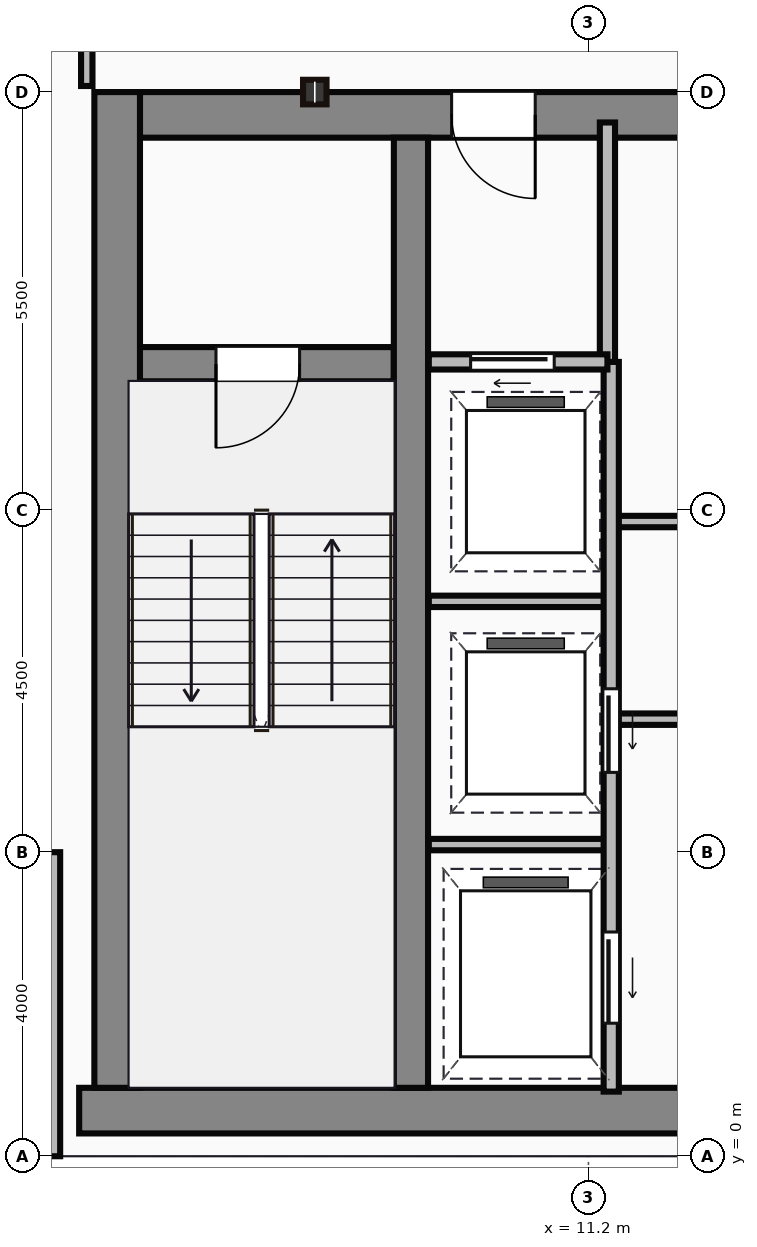
"""IFC4 building model, lengths in metres.
Left out: names, types, materials, properties, quantities, classifications, styles, units other than length and angle.
Written with IfcOpenShell. Run it as: python <this file> out.ifc"""

import sys

from ifc_helpers import new_model, si_unit, direction, frame, frame_2d, origin, origin_2d, place, context, subcontext, project, spatial, rectangle, i_section, extrude, source, transform, mapped, element, fill, save


model = new_model("IFC4")
c1 = context("Model", 3, precision=1e-05, world=origin(), true_north=direction((0.0, 1.0)))
c2 = subcontext(c1, "Body", "Model", "MODEL_VIEW")
j1 = project(units=[si_unit("LENGTHUNIT", "METRE"), si_unit("PLANEANGLEUNIT", "RADIAN")], contexts=[c1])
p1 = place(None, origin())
s1 = spatial("IfcSite", under=j1, at=p1, CompositionType="ELEMENT")
p2 = place(p1, origin())
s2 = spatial("IfcBuilding", under=s1, at=p2, CompositionType="ELEMENT")
p3 = place(p2, frame((0.0, 0.0, 221.45)))
s3 = spatial("IfcBuildingStorey", under=s2, at=p3, CompositionType="ELEMENT", Elevation=221.45)
m1 = source(origin(), c2, "Body", "SweptSolid", [
    extrude(rectangle(XDim=29.5, YDim=0.6, at=frame_2d((14.75, 0.0))), origin(), (0.0, 0.0, 1.0), 3.65),
])
p4 = place(p3, frame((4.5, 0.6, 0.0), z_axis=(0.0, 0.0, 1.0), x_axis=(1.0, 0.0, 0.0)))
e1 = element("IfcWall", 1, at=p4, inside=s3, PredefinedType="SHEAR", context=c2, shape_type="MappedRepresentation", body=[
    mapped(m1, transform((0.0, 0.0, 0.0))),
])
m2 = source(origin(), c2, "Body", "SweptSolid", [
    extrude(rectangle(XDim=13.1, YDim=0.6, at=frame_2d((6.55, 0.0))), origin(), (0.0, 0.0, 1.0), 3.65),
])
p5 = place(p3, frame((5.0, 0.9, 0.0), z_axis=(0.0, 0.0, 1.0), x_axis=(0.0, 1.0, 0.0)))
e2 = element("IfcWall", 2, at=p5, inside=s3, PredefinedType="SHEAR", context=c2, shape_type="MappedRepresentation", body=[
    mapped(m2, transform((0.0, 0.0, 0.0))),
])
m3 = source(origin(), c2, "Body", "SweptSolid", [
    extrude(rectangle(XDim=9.1, YDim=0.6, at=frame_2d((4.55, 0.0))), origin(), (0.0, 0.0, 1.0), 3.65),
])
p6 = place(p3, frame((5.3, 13.7, 0.0), z_axis=(0.0, 0.0, 1.0), x_axis=(1.0, 0.0, 0.0)))
e3 = element("IfcWall", 3, at=p6, inside=s3, PredefinedType="SHEAR", context=c2, shape_type="MappedRepresentation", body=[
    mapped(m3, transform((0.0, 0.0, 0.0))),
])
p7 = place(p6, frame((4.1, 0.0, 0.0)))
e4 = element("IfcOpeningElement", 4, at=p7, cuts=e3, PredefinedType="OPENING", context=c2, shape_type="SweptSolid", body=[
    extrude(rectangle(XDim=1.1, YDim=2.15, at=frame_2d((0.55, 1.075))), frame((0.0, 0.31, 0.0), z_axis=(0.0, -1.0, 0.0), x_axis=(1.0, 0.0, 0.0)), (0.0, 0.0, 1.0), 0.62),
])
m4 = source(origin(), c2, "Body", "SweptSolid", [
    extrude(rectangle(XDim=12.5, YDim=0.45, at=frame_2d((6.25, 0.0))), origin(), (0.0, 0.0, 1.0), 3.65),
])
p8 = place(p3, frame((8.865, 0.9, 0.0), z_axis=(0.0, 0.0, 1.0), x_axis=(0.0, 1.0, 0.0)))
e5 = element("IfcWall", 5, at=p8, inside=s3, PredefinedType="SHEAR", context=c2, shape_type="MappedRepresentation", body=[
    mapped(m4, transform((0.0, 0.0, 0.0))),
])
m5 = source(origin(), c2, "Body", "SweptSolid", [
    extrude(rectangle(XDim=3.39, YDim=0.45, at=frame_2d((1.695, 0.0))), origin(), (0.0, 0.0, 1.0), 3.65),
])
p9 = place(p3, frame((5.25, 10.42, 0.0), z_axis=(0.0, 0.0, 1.0), x_axis=(1.0, 0.0, 0.0)))
e6 = element("IfcWall", 6, at=p9, inside=s3, PredefinedType="SHEAR", context=c2, shape_type="MappedRepresentation", body=[
    mapped(m5, transform((0.0, 0.0, 0.0))),
])
p10 = place(p9, frame((1.05, 0.0, 0.0)))
e7 = element("IfcOpeningElement", 7, at=p10, cuts=e6, PredefinedType="OPENING", context=c2, shape_type="SweptSolid", body=[
    extrude(rectangle(XDim=1.1, YDim=2.15, at=frame_2d((0.55, 1.075))), frame((0.0, 0.235, 0.0), z_axis=(0.0, -1.0, 0.0), x_axis=(1.0, 0.0, 0.0)), (0.0, 0.0, 1.0), 0.47),
])
m6 = source(origin(), c2, "Body", "SweptSolid", [
    extrude(i_section(OverallWidth=0.309, OverallDepth=0.323, WebThickness=0.014, FlangeThickness=0.023, at=origin_2d()), origin(), (0.0, 0.0, 1.0), 3.65),
])
p11 = place(p3, frame((7.6, 14.0, 0.0), z_axis=(0.0, 0.0, 1.0), x_axis=(1.0, 0.0, 0.0)))
e8 = element("IfcColumn", 8, at=p11, inside=s3, PredefinedType="COLUMN", context=c2, shape_type="MappedRepresentation", body=[
    mapped(m6, transform((0.0, 0.0, 0.0))),
])
m7 = source(origin(), c2, "Body", "SweptSolid", [
    extrude(rectangle(XDim=4.0, YDim=0.25, at=frame_2d((2.0, 0.0))), origin(), (0.0, 0.0, 1.0), 3.4),
])
p12 = place(p3, frame((4.125, 4.0, 0.0), z_axis=(0.0, 0.0, 1.0), x_axis=(0.0, -1.0, 0.0)))
e9 = element("IfcWall", 9, at=p12, inside=s3, PredefinedType="STANDARD", context=c2, shape_type="MappedRepresentation", body=[
    mapped(m7, transform((0.0, 0.0, 0.0))),
])
m8 = source(origin(), c2, "Body", "SweptSolid", [
    extrude(rectangle(XDim=3.18, YDim=0.2, at=frame_2d((1.59, 0.0))), origin(), (0.0, 0.0, 1.0), 3.4),
])
p13 = place(p3, frame((11.45, 10.42, 0.0), z_axis=(0.0, 0.0, 1.0), x_axis=(0.0, 1.0, 0.0)))
e10 = element("IfcWall", 10, at=p13, inside=s3, PredefinedType="PARTITIONING", context=c2, shape_type="MappedRepresentation", body=[
    mapped(m8, transform((0.0, 0.0, 0.0))),
])
m9 = source(origin(), c2, "Body", "SweptSolid", [
    extrude(rectangle(XDim=2.35, YDim=0.2, at=frame_2d((1.175, 0.0))), origin(), (0.0, 0.0, 1.0), 3.4),
])
p14 = place(p3, frame((9.1, 10.45, 0.0), z_axis=(0.0, 0.0, 1.0), x_axis=(1.0, 0.0, 0.0)))
e11 = element("IfcWall", 11, at=p14, inside=s3, PredefinedType="PARTITIONING", context=c2, shape_type="MappedRepresentation", body=[
    mapped(m9, transform((0.0, 0.0, 0.0))),
])
p15 = place(p14, frame((0.55, 0.0, 0.0)))
e12 = element("IfcOpeningElement", 12, at=p15, cuts=e11, PredefinedType="OPENING", context=c2, shape_type="SweptSolid", body=[
    extrude(rectangle(XDim=1.1, YDim=2.15, at=frame_2d((0.55, 1.075))), frame((0.0, 0.11, 0.0), z_axis=(0.0, -1.0, 0.0), x_axis=(1.0, 0.0, 0.0)), (0.0, 0.0, 1.0), 0.22),
])
m10 = source(origin(), c2, "Body", "SweptSolid", [
    extrude(rectangle(XDim=9.6, YDim=0.2, at=frame_2d((4.8, 0.0))), origin(), (0.0, 0.0, 1.0), 3.4),
])
p16 = place(p3, frame((11.5, 0.85, 0.0), z_axis=(0.0, 0.0, 1.0), x_axis=(0.0, 1.0, 0.0)))
e13 = element("IfcWall", 13, at=p16, inside=s3, PredefinedType="PARTITIONING", context=c2, shape_type="MappedRepresentation", body=[
    mapped(m10, transform((0.0, 0.0, 0.0))),
])
p17 = place(p16, frame((4.2, 0.0, 0.0)))
e14 = element("IfcOpeningElement", 14, at=p17, cuts=e13, PredefinedType="OPENING", context=c2, shape_type="SweptSolid", body=[
    extrude(rectangle(XDim=1.1, YDim=2.15, at=frame_2d((0.55, 1.075))), frame((0.0, 0.11, 0.0), z_axis=(0.0, -1.0, 0.0), x_axis=(1.0, 0.0, 0.0)), (0.0, 0.0, 1.0), 0.22),
])
p18 = place(p16, frame((0.9, 0.0, 0.0)))
e15 = element("IfcOpeningElement", 15, at=p18, cuts=e13, PredefinedType="OPENING", context=c2, shape_type="SweptSolid", body=[
    extrude(rectangle(XDim=1.2, YDim=2.15, at=frame_2d((0.6, 1.075))), frame((0.0, 0.11, 0.0), z_axis=(0.0, -1.0, 0.0), x_axis=(1.0, 0.0, 0.0)), (0.0, 0.0, 1.0), 0.22),
])
m11 = source(origin(), c2, "Body", "SweptSolid", [
    extrude(rectangle(XDim=2.4, YDim=0.15, at=frame_2d((1.2, 0.0))), origin(), (0.0, 0.0, 1.0), 3.4),
])
for number, where, z_axis, x_axis in (
    (16, (9.1, 4.1, 0.0), (0.0, 0.0, 1.0), (1.0, 0.0, 0.0)),
    (17, (9.1, 7.3, 0.0), (0.0, 0.0, 1.0), (1.0, 0.0, 0.0)),
):
    element("IfcWall", number, at=place(p3, frame(where, z_axis=z_axis, x_axis=x_axis)), inside=s3, PredefinedType="PARTITIONING", context=c2, shape_type="MappedRepresentation", body=[
        mapped(m11, transform((0.0, 0.0, 0.0))),
    ])
m12 = source(origin(), c2, "Body", "SweptSolid", [
    extrude(rectangle(XDim=11.85, YDim=0.15, at=frame_2d((5.925, 0.0))), origin(), (0.0, 0.0, 1.0), 3.4),
])
p19 = place(p3, frame((11.55, 5.75, 0.0), z_axis=(0.0, 0.0, 1.0), x_axis=(1.0, 0.0, 0.0)))
e18 = element("IfcWall", 18, at=p19, inside=s3, PredefinedType="PARTITIONING", context=c2, shape_type="MappedRepresentation", body=[
    mapped(m12, transform((0.0, 0.0, 0.0))),
])
p20 = place(p3, frame((11.55, 8.35, 0.0), z_axis=(0.0, 0.0, 1.0), x_axis=(1.0, 0.0, 0.0)))
e19 = element("IfcWall", 19, at=p20, inside=s3, PredefinedType="PARTITIONING", context=c2, shape_type="MappedRepresentation", body=[
    mapped(m12, transform((0.0, 0.0, 0.0))),
])
p21 = place(p20, frame((1.1, 0.0, 0.0)))
e20 = element("IfcOpeningElement", 20, at=p21, cuts=e19, PredefinedType="OPENING", context=c2, shape_type="SweptSolid", body=[
    extrude(rectangle(XDim=0.95, YDim=2.15, at=frame_2d((0.475, 1.075))), frame((0.0, 0.085, 0.0), z_axis=(0.0, -1.0, 0.0), x_axis=(1.0, 0.0, 0.0)), (0.0, 0.0, 1.0), 0.17),
])
p22 = place(p20, frame((9.4, 0.0, 0.0)))
e21 = element("IfcOpeningElement", 21, at=p22, cuts=e19, PredefinedType="OPENING", context=c2, shape_type="SweptSolid", body=[
    extrude(rectangle(XDim=0.95, YDim=2.15, at=frame_2d((0.475, 1.075))), frame((0.0, 0.085, 0.0), z_axis=(0.0, -1.0, 0.0), x_axis=(1.0, 0.0, 0.0)), (0.0, 0.0, 1.0), 0.17),
])
m13 = source(origin(), c2, "Body", "SweptSolid", [
    extrude(rectangle(XDim=2.12, YDim=0.15, at=frame_2d((1.06, 0.0))), origin(), (0.0, 0.0, 1.0), 3.4),
])
p23 = place(p3, frame((4.6, 14.08, 0.0), z_axis=(0.0, 0.0, 1.0), x_axis=(0.0, 1.0, 0.0)))
e22 = element("IfcWall", 22, at=p23, inside=s3, PredefinedType="PARTITIONING", context=c2, shape_type="MappedRepresentation", body=[
    mapped(m13, transform((0.0, 0.0, 0.0))),
])
m14 = source(origin(), c2, "Body", "SweptSolid", [
    extrude(rectangle(XDim=1.1, YDim=2.15, at=frame_2d((0.55, 1.075))), frame((0.0, 0.025, 0.0), z_axis=(0.0, -1.0, 0.0), x_axis=(1.0, 0.0, 0.0)), (0.0, 0.0, 1.0), 0.05),
])
p24 = place(p10, frame((1.1, 0.0, 0.0), z_axis=(0.0, 0.0, 1.0), x_axis=(-1.0, 0.0, 0.0)))
e23 = element("IfcDoor", 23, at=p24, inside=s3, OperationType="SINGLE_SWING_LEFT", PredefinedType="DOOR", context=c2, shape_type="MappedRepresentation", body=[
    mapped(m14, transform((0.0, 0.0, 0.0))),
])
fill(e7, e23)
p25 = place(p7, origin())
e24 = element("IfcDoor", 24, at=p25, inside=s3, OperationType="SINGLE_SWING_RIGHT", PredefinedType="DOOR", context=c2, shape_type="MappedRepresentation", body=[
    mapped(m14, transform((0.0, 0.0, 0.0))),
])
fill(e4, e24)
p26 = place(p15, origin())
e25 = element("IfcDoor", 25, at=p26, inside=s3, OperationType="SLIDING_TO_LEFT", PredefinedType="DOOR", context=c2, shape_type="MappedRepresentation", body=[
    mapped(m14, transform((0.0, 0.0, 0.0))),
])
fill(e12, e25)
p27 = place(p17, frame((1.1, 0.0, 0.0), z_axis=(0.0, 0.0, 1.0), x_axis=(-1.0, 0.0, 0.0)))
e26 = element("IfcDoor", 26, at=p27, inside=s3, OperationType="SLIDING_TO_LEFT", PredefinedType="DOOR", context=c2, shape_type="MappedRepresentation", body=[
    mapped(m14, transform((0.0, 0.0, 0.0))),
])
fill(e14, e26)
m15 = source(origin(), c2, "Body", "SweptSolid", [
    extrude(rectangle(XDim=1.2, YDim=2.15, at=frame_2d((0.6, 1.075))), frame((0.0, 0.025, 0.0), z_axis=(0.0, -1.0, 0.0), x_axis=(1.0, 0.0, 0.0)), (0.0, 0.0, 1.0), 0.05),
])
p28 = place(p18, frame((1.2, 0.0, 0.0), z_axis=(0.0, 0.0, 1.0), x_axis=(-1.0, 0.0, 0.0)))
e27 = element("IfcDoor", 27, at=p28, inside=s3, OperationType="SLIDING_TO_LEFT", PredefinedType="DOOR", context=c2, shape_type="MappedRepresentation", body=[
    mapped(m15, transform((0.0, 0.0, 0.0))),
])
fill(e15, e27)
save(model, sys.argv[1])
